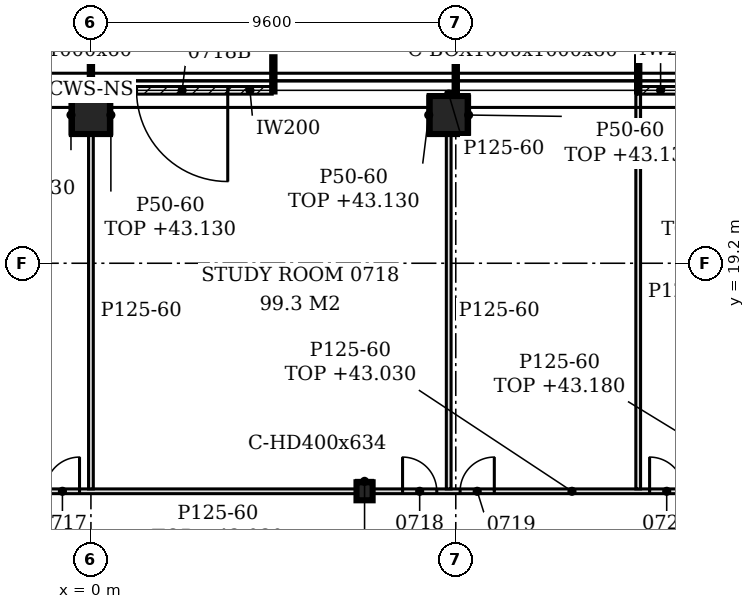
"""IFC4 building model, lengths in metres.
Left out: names, types, materials, properties, quantities, classifications, styles, units other than length and angle.
Written with IfcOpenShell. Run it as: python <this file> out.ifc"""

import sys

from ifc_helpers import new_model, si_unit, direction, frame, frame_2d, origin, origin_2d, place, context, subcontext, project, spatial, polyline, rectangle, hollow_rectangle, i_section, outline, extrude, element, fill, save


model = new_model("IFC4")
c1 = context("Model", 3, precision=1e-05, world=origin(), true_north=direction((0.0, 1.0)))
c2 = subcontext(c1, "Body", "Model", "MODEL_VIEW")
j1 = project(units=[si_unit("LENGTHUNIT", "METRE"), si_unit("PLANEANGLEUNIT", "RADIAN")], contexts=[c1])
p1 = place(None, origin())
s1 = spatial("IfcSite", under=j1, at=p1, CompositionType="ELEMENT")
p2 = place(p1, origin())
s2 = spatial("IfcBuilding", under=s1, at=p2, CompositionType="ELEMENT")
p3 = place(p2, frame((0.0, 0.0, 40.2)))
s3 = spatial("IfcBuildingStorey", under=s2, at=p3, CompositionType="ELEMENT", Elevation=40.2)
for number, where, z_axis, x_axis in (
    (1, (9.414, 23.1, -0.15), (0.0, 0.0, 1.0), (1.0, 0.0, 0.0)),
    (2, (0.0, 23.1, -0.15), (0.0, 0.0, 1.0), (1.0, 0.0, 0.0)),
):
    element("IfcColumn", number, at=place(p3, frame(where, z_axis=z_axis, x_axis=x_axis)), inside=s3, PredefinedType="COLUMN", context=c2, shape_type="SweptSolid", body=[
        extrude(hollow_rectangle(XDim=1.0, YDim=1.0, WallThickness=0.06, at=origin_2d()), origin(), (0.0, 0.0, 1.0), 3.6),
    ])
p4 = place(p3, frame((7.2, 13.2, -0.15), z_axis=(0.0, 0.0, 1.0), x_axis=(1.0, 0.0, 0.0)))
e3 = element("IfcColumn", 3, at=p4, inside=s3, PredefinedType="COLUMN", context=c2, shape_type="SweptSolid", body=[
    extrude(i_section(OverallWidth=0.424, OverallDepth=0.474, WebThickness=0.048, FlangeThickness=0.077, FilletRadius=0.015, at=origin_2d()), origin(), (0.0, 0.0, 1.0), 3.6),
])
p5 = place(p3, frame((19.056, 23.75, 0.0), z_axis=(0.0, 0.0, 1.0), x_axis=(-1.0, 0.0, 0.0)))
e4 = element("IfcWall", 4, at=p5, inside=s3, PredefinedType="NOTDEFINED", context=c2, shape_type="SweptSolid", body=[
    extrude(rectangle(XDim=4.626, YDim=0.2, at=frame_2d((2.313, 0.0))), origin(), (0.0, 0.0, 1.0), 3.45),
])
p6 = place(p5, frame((1.108, 0.0, 0.0)))
e5 = element("IfcOpeningElement", 5, at=p6, cuts=e4, PredefinedType="OPENING", context=c2, shape_type="SweptSolid", body=[
    extrude(rectangle(XDim=2.4, YDim=2.4, at=frame_2d((1.2, 1.2))), frame((0.0, 0.11, 0.0), z_axis=(0.0, -1.0, 0.0), x_axis=(1.0, 0.0, 0.0)), (0.0, 0.0, 1.0), 0.22),
])
p7 = place(p3, frame((4.77, 23.75, 0.0), z_axis=(0.0, 0.0, 1.0), x_axis=(-1.0, 0.0, 0.0)))
e6 = element("IfcWall", 6, at=p7, inside=s3, PredefinedType="NOTDEFINED", context=c2, shape_type="SweptSolid", body=[
    extrude(rectangle(XDim=4.74, YDim=0.2, at=frame_2d((2.37, 0.0))), origin(), (0.0, 0.0, 1.0), 3.45),
])
p8 = place(p7, frame((1.17, 0.0, 0.0)))
e7 = element("IfcOpeningElement", 7, at=p8, cuts=e6, PredefinedType="OPENING", context=c2, shape_type="SweptSolid", body=[
    extrude(rectangle(XDim=2.4, YDim=2.4, at=frame_2d((1.2, 1.2))), frame((0.0, 0.11, 0.0), z_axis=(0.0, -1.0, 0.0), x_axis=(1.0, 0.0, 0.0)), (0.0, 0.0, 1.0), 0.22),
])
p9 = place(p3, frame((-4.588, 13.2, 0.0), z_axis=(0.0, 0.0, 1.0), x_axis=(1.0, 0.0, 0.0)))
e8 = element("IfcWall", 8, at=p9, inside=s3, PredefinedType="PARTITIONING", context=c2, shape_type="SweptSolid", body=[
    extrude(rectangle(XDim=11.576, YDim=0.125, at=frame_2d((5.788, 0.0))), origin(), (0.0, 0.0, 1.0), 2.83),
])
p10 = place(p9, frame((3.388, 0.0, 0.0)))
e9 = element("IfcOpeningElement", 9, at=p10, cuts=e8, PredefinedType="OPENING", context=c2, shape_type="SweptSolid", body=[
    extrude(rectangle(XDim=0.9, YDim=2.1, at=frame_2d((0.45, 1.05))), frame((0.0, 0.073, 0.0), z_axis=(0.0, -1.0, 0.0), x_axis=(1.0, 0.0, 0.0)), (0.0, 0.0, 1.0), 0.145),
])
p11 = place(p3, frame((7.412, 13.2, 0.0), z_axis=(0.0, 0.0, 1.0), x_axis=(1.0, 0.0, 0.0)))
e10 = element("IfcWall", 10, at=p11, inside=s3, PredefinedType="PARTITIONING", context=c2, shape_type="SweptSolid", body=[
    extrude(rectangle(XDim=11.576, YDim=0.125, at=frame_2d((5.788, 0.0))), origin(), (0.0, 0.0, 1.0), 2.83),
])
p12 = place(p11, frame((0.788, 0.0, 0.0)))
e11 = element("IfcOpeningElement", 11, at=p12, cuts=e10, PredefinedType="OPENING", context=c2, shape_type="SweptSolid", body=[
    extrude(rectangle(XDim=0.9, YDim=2.1, at=frame_2d((0.45, 1.05))), frame((0.0, 0.073, 0.0), z_axis=(0.0, -1.0, 0.0), x_axis=(1.0, 0.0, 0.0)), (0.0, 0.0, 1.0), 0.145),
])
p13 = place(p11, frame((2.302, 0.0, 0.0)))
e12 = element("IfcOpeningElement", 12, at=p13, cuts=e10, PredefinedType="OPENING", context=c2, shape_type="SweptSolid", body=[
    extrude(rectangle(XDim=0.9, YDim=2.1, at=frame_2d((0.45, 1.05))), frame((0.0, 0.073, 0.0), z_axis=(0.0, -1.0, 0.0), x_axis=(1.0, 0.0, 0.0)), (0.0, 0.0, 1.0), 0.145),
])
p14 = place(p11, frame((7.288, 0.0, 0.0)))
e13 = element("IfcOpeningElement", 13, at=p14, cuts=e10, PredefinedType="OPENING", context=c2, shape_type="SweptSolid", body=[
    extrude(rectangle(XDim=0.9, YDim=2.1, at=frame_2d((0.45, 1.05))), frame((0.0, 0.073, 0.0), z_axis=(0.0, -1.0, 0.0), x_axis=(1.0, 0.0, 0.0)), (0.0, 0.0, 1.0), 0.145),
])
for number, where, z_axis, x_axis in (
    (14, (0.0, 13.262, 0.0), (0.0, 0.0, 1.0), (0.0, 1.0, 0.0)),
    (15, (9.414, 13.262, 0.0), (0.0, 0.0, 1.0), (0.0, 1.0, 0.0)),
):
    element("IfcWall", number, at=place(p3, frame(where, z_axis=z_axis, x_axis=x_axis)), inside=s3, PredefinedType="PARTITIONING", context=c2, shape_type="SweptSolid", body=[
        extrude(outline(polyline([(0.0, 0.0), (9.338, 0.0), (9.337, 3.45), (6.042, 3.45), (6.041, 2.88), (5.833, 2.88), (5.831, 3.45), (0.087, 3.45), (0.085, 2.83), (0.0, 2.83), (0.0, 0.0)])), frame((0.0, 0.062, 0.0), z_axis=(0.0, -1.0, 0.0), x_axis=(1.0, 0.0, 0.0)), (0.0, 0.0, 1.0), 0.125),
    ])
p15 = place(p3, frame((14.4, 13.262, 0.0), z_axis=(0.0, 0.0, 1.0), x_axis=(0.0, 1.0, 0.0)))
e16 = element("IfcWall", 16, at=p15, inside=s3, PredefinedType="PARTITIONING", context=c2, shape_type="SweptSolid", body=[
    extrude(outline(polyline([(0.0, 0.0), (10.387, 0.0), (10.387, 3.45), (9.988, 3.45), (9.986, 2.93), (9.688, 2.93), (9.686, 3.45), (6.042, 3.45), (6.041, 2.88), (5.833, 2.88), (5.831, 3.45), (0.087, 3.45), (0.085, 2.83), (0.0, 2.83), (0.0, 0.0)])), frame((0.0, 0.062, 0.0), z_axis=(0.0, -1.0, 0.0), x_axis=(1.0, 0.0, 0.0)), (0.0, 0.0, 1.0), 0.125),
])
p16 = place(p3, frame((9.414, 23.6, 0.0), z_axis=(0.0, 0.0, 1.0), x_axis=(0.0, 1.0, 0.0)))
e17 = element("IfcWall", 17, at=p16, inside=s3, PredefinedType="PARTITIONING", context=c2, shape_type="SweptSolid", body=[
    extrude(rectangle(XDim=0.103, YDim=0.125, at=frame_2d((0.051, 0.0))), origin(), (0.0, 0.0, 1.0), 3.45),
])
p17 = place(p3, frame((6.988, 13.462, 0.0), z_axis=(0.0, 0.0, 1.0), x_axis=(1.0, 0.0, 0.0)))
e18 = element("IfcWall", 18, at=p17, inside=s3, PredefinedType="PARTITIONING", context=c2, shape_type="SweptSolid", body=[
    extrude(rectangle(XDim=0.424, YDim=0.05, at=frame_2d((0.212, 0.0))), origin(), (0.0, 0.0, 1.0), 2.93),
])
for number, where, z_axis, x_axis in (
    (19, (-0.525, 22.6, 0.0), (0.0, 0.0, 1.0), (0.0, 1.0, 0.0)),
    (20, (0.525, 22.6, 0.0), (0.0, 0.0, 1.0), (0.0, 1.0, 0.0)),
    (21, (8.889, 22.6, 0.0), (0.0, 0.0, 1.0), (0.0, 1.0, 0.0)),
    (22, (9.939, 22.6, 0.0), (0.0, 0.0, 1.0), (0.0, 1.0, 0.0)),
):
    element("IfcWall", number, at=place(p3, frame(where, z_axis=z_axis, x_axis=x_axis)), inside=s3, PredefinedType="PARTITIONING", context=c2, shape_type="SweptSolid", body=[
        extrude(rectangle(XDim=1.0, YDim=0.05, at=frame_2d((0.5, 0.0))), origin(), (0.0, 0.0, 1.0), 2.93),
    ])
p18 = place(p8, origin())
e23 = element("IfcDoor", 23, at=p18, inside=s3, OperationType="SINGLE_SWING_LEFT", PredefinedType="DOOR", context=c2, shape_type="SweptSolid", body=[
    extrude(rectangle(XDim=2.4, YDim=2.4, at=frame_2d((1.2, 1.2))), frame((0.0, 0.025, 0.0), z_axis=(0.0, -1.0, 0.0), x_axis=(1.0, 0.0, 0.0)), (0.0, 0.0, 1.0), 0.05),
])
fill(e7, e23)
p19 = place(p10, origin())
e24 = element("IfcDoor", 24, at=p19, inside=s3, OperationType="SINGLE_SWING_RIGHT", PredefinedType="DOOR", context=c2, shape_type="SweptSolid", body=[
    extrude(rectangle(XDim=0.9, YDim=2.1, at=frame_2d((0.45, 1.05))), frame((0.0, 0.025, 0.0), z_axis=(0.0, -1.0, 0.0), x_axis=(1.0, 0.0, 0.0)), (0.0, 0.0, 1.0), 0.05),
])
fill(e9, e24)
p20 = place(p12, origin())
e25 = element("IfcDoor", 25, at=p20, inside=s3, OperationType="SINGLE_SWING_LEFT", PredefinedType="DOOR", context=c2, shape_type="SweptSolid", body=[
    extrude(rectangle(XDim=0.9, YDim=2.1, at=frame_2d((0.45, 1.05))), frame((0.0, 0.025, 0.0), z_axis=(0.0, -1.0, 0.0), x_axis=(1.0, 0.0, 0.0)), (0.0, 0.0, 1.0), 0.05),
])
fill(e11, e25)
p21 = place(p13, origin())
e26 = element("IfcDoor", 26, at=p21, inside=s3, OperationType="SINGLE_SWING_RIGHT", PredefinedType="DOOR", context=c2, shape_type="SweptSolid", body=[
    extrude(rectangle(XDim=0.9, YDim=2.1, at=frame_2d((0.45, 1.05))), frame((0.0, 0.025, 0.0), z_axis=(0.0, -1.0, 0.0), x_axis=(1.0, 0.0, 0.0)), (0.0, 0.0, 1.0), 0.05),
])
fill(e12, e26)
p22 = place(p14, origin())
e27 = element("IfcDoor", 27, at=p22, inside=s3, OperationType="SINGLE_SWING_LEFT", PredefinedType="DOOR", context=c2, shape_type="SweptSolid", body=[
    extrude(rectangle(XDim=0.9, YDim=2.1, at=frame_2d((0.45, 1.05))), frame((0.0, 0.025, 0.0), z_axis=(0.0, -1.0, 0.0), x_axis=(1.0, 0.0, 0.0)), (0.0, 0.0, 1.0), 0.05),
])
fill(e13, e27)
save(model, sys.argv[1])
